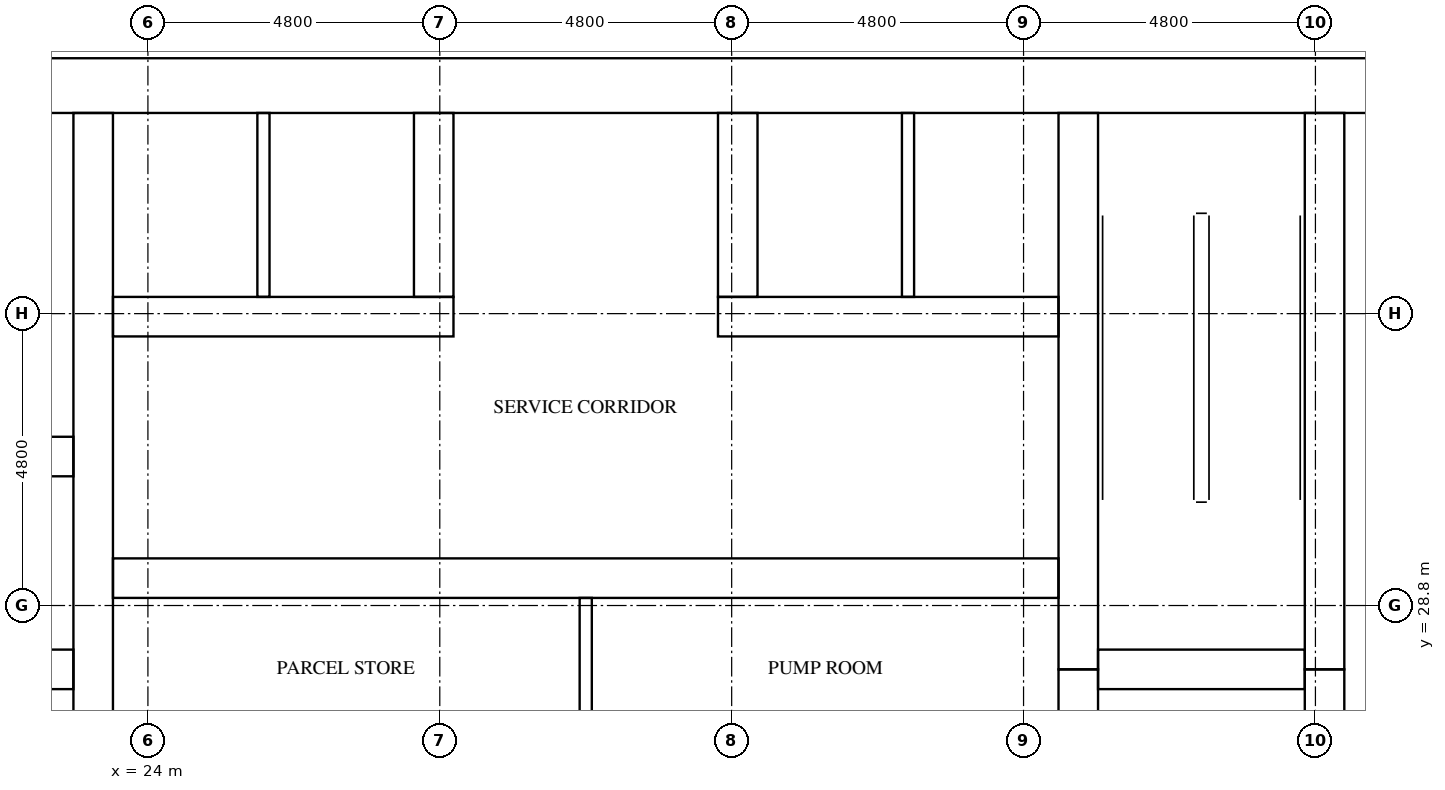
"""IFC4 building model, lengths in metres.
Left out: names, types, materials, properties, quantities, classifications, styles, units other than length and angle.
Written with IfcOpenShell. Run it as: python <this file> out.ifc"""

import sys

from ifc_helpers import new_model, si_unit, direction, frame, frame_2d, origin, place, context, subcontext, project, spatial, rectangle, extrude, element, fill, save


model = new_model("IFC4")
c1 = context("Model", 3, precision=1e-05, world=origin(), true_north=direction((0.0, 1.0)))
c2 = subcontext(c1, "Body", "Model", "MODEL_VIEW")
j1 = project(units=[si_unit("LENGTHUNIT", "METRE"), si_unit("PLANEANGLEUNIT", "RADIAN")], contexts=[c1])
p1 = place(None, origin())
s1 = spatial("IfcSite", under=j1, at=p1, CompositionType="ELEMENT")
p2 = place(p1, origin())
s2 = spatial("IfcBuilding", under=s1, at=p2, CompositionType="ELEMENT")
p3 = place(p2, frame((0.0, 0.0, 83.8)))
s3 = spatial("IfcBuildingStorey", under=s2, at=p3, CompositionType="ELEMENT", Elevation=83.8)
p4 = place(p3, frame((15.0, 37.35, 0.0), z_axis=(0.0, 0.0, 1.0), x_axis=(1.0, 0.0, 0.0)))
e1 = element("IfcWall", 1, at=p4, inside=s3, PredefinedType="SHEAR", context=c2, shape_type="SweptSolid", body=[
    extrude(rectangle(XDim=32.4, YDim=0.9, at=frame_2d((16.2, 0.0))), origin(), (0.0, 0.0, 1.0), 5.1),
])
p5 = place(p4, frame((15.3, 0.0, 0.0)))
e2 = element("IfcOpeningElement", 2, at=p5, cuts=e1, PredefinedType="OPENING", context=c2, shape_type="SweptSolid", body=[
    extrude(rectangle(XDim=1.8, YDim=2.1, at=frame_2d((0.9, 1.05))), frame((0.0, 0.46, 0.0), z_axis=(0.0, -1.0, 0.0), x_axis=(1.0, 0.0, 0.0)), (0.0, 0.0, 1.0), 0.92),
])
p6 = place(p4, frame((1.794, 0.0, 0.0)))
e3 = element("IfcOpeningElement", 3, at=p6, cuts=e1, PredefinedType="OPENING", context=c2, shape_type="SweptSolid", body=[
    extrude(rectangle(XDim=1.0, YDim=2.1, at=frame_2d((0.5, 1.05))), frame((0.0, 0.46, 0.0), z_axis=(0.0, -1.0, 0.0), x_axis=(1.0, 0.0, 0.0)), (0.0, 0.0, 1.0), 0.92),
])
p7 = place(p4, frame((5.331, 0.0, 0.0)))
e4 = element("IfcOpeningElement", 4, at=p7, cuts=e1, PredefinedType="OPENING", context=c2, shape_type="SweptSolid", body=[
    extrude(rectangle(XDim=1.0, YDim=2.1, at=frame_2d((0.5, 1.05))), frame((0.0, 0.46, 0.0), z_axis=(0.0, -1.0, 0.0), x_axis=(1.0, 0.0, 0.0)), (0.0, 0.0, 1.0), 0.92),
])
p8 = place(p3, frame((23.1, 15.9, 0.0), z_axis=(0.0, 0.0, 1.0), x_axis=(0.0, 1.0, 0.0)))
e5 = element("IfcWall", 5, at=p8, inside=s3, PredefinedType="SHEAR", context=c2, shape_type="SweptSolid", body=[
    extrude(rectangle(XDim=21.0, YDim=0.65, at=frame_2d((10.5, 0.0))), origin(), (0.0, 0.0, 1.0), 5.1),
])
p9 = place(p3, frame((39.3, 24.25, 0.0), z_axis=(0.0, 0.0, 1.0), x_axis=(0.0, 1.0, 0.0)))
e6 = element("IfcWall", 6, at=p9, inside=s3, PredefinedType="SHEAR", context=c2, shape_type="SweptSolid", body=[
    extrude(rectangle(XDim=3.5, YDim=0.65, at=frame_2d((1.75, 0.0))), origin(), (0.0, 0.0, 1.0), 5.1),
])
p10 = place(p3, frame((39.3, 27.75, 0.0), z_axis=(0.0, 0.0, 1.0), x_axis=(0.0, 1.0, 0.0)))
e7 = element("IfcWall", 7, at=p10, inside=s3, PredefinedType="SHEAR", context=c2, shape_type="SweptSolid", body=[
    extrude(rectangle(XDim=9.15, YDim=0.65, at=frame_2d((4.575, 0.0))), origin(), (0.0, 0.0, 1.0), 5.1),
])
p11 = place(p3, frame((43.35, 24.25, 0.0), z_axis=(0.0, 0.0, 1.0), x_axis=(0.0, 1.0, 0.0)))
e8 = element("IfcWall", 8, at=p11, inside=s3, PredefinedType="SHEAR", context=c2, shape_type="SweptSolid", body=[
    extrude(rectangle(XDim=3.5, YDim=0.65, at=frame_2d((1.75, 0.0))), origin(), (0.0, 0.0, 1.0), 5.1),
])
p12 = place(p11, frame((1.2, 0.0, 0.0)))
e9 = element("IfcOpeningElement", 9, at=p12, cuts=e8, PredefinedType="OPENING", context=c2, shape_type="SweptSolid", body=[
    extrude(rectangle(XDim=1.1, YDim=2.1, at=frame_2d((0.55, 1.05))), frame((0.0, 0.335, 0.0), z_axis=(0.0, -1.0, 0.0), x_axis=(1.0, 0.0, 0.0)), (0.0, 0.0, 1.0), 0.67),
])
p13 = place(p3, frame((43.35, 27.75, 0.0), z_axis=(0.0, 0.0, 1.0), x_axis=(0.0, 1.0, 0.0)))
e10 = element("IfcWall", 10, at=p13, inside=s3, PredefinedType="SHEAR", context=c2, shape_type="SweptSolid", body=[
    extrude(rectangle(XDim=9.15, YDim=0.65, at=frame_2d((4.575, 0.0))), origin(), (0.0, 0.0, 1.0), 5.1),
])
p14 = place(p13, frame((7.65, 0.0, 0.0)))
e11 = element("IfcOpeningElement", 11, at=p14, cuts=e10, PredefinedType="OPENING", context=c2, shape_type="SweptSolid", body=[
    extrude(rectangle(XDim=1.2, YDim=2.1, at=frame_2d((0.6, 1.05))), frame((0.0, 0.335, 0.0), z_axis=(0.0, -1.0, 0.0), x_axis=(1.0, 0.0, 0.0)), (0.0, 0.0, 1.0), 0.67),
])
p15 = place(p3, frame((19.375, 27.75, 0.0), z_axis=(0.0, 0.0, 1.0), x_axis=(1.0, 0.0, 0.0)))
e12 = element("IfcWall", 12, at=p15, inside=s3, PredefinedType="SHEAR", context=c2, shape_type="SweptSolid", body=[
    extrude(rectangle(XDim=3.4, YDim=0.65, at=frame_2d((1.7, 0.0))), origin(), (0.0, 0.0, 1.0), 5.1),
])
p16 = place(p3, frame((15.9, 31.25, 0.0), z_axis=(0.0, 0.0, 1.0), x_axis=(1.0, 0.0, 0.0)))
e13 = element("IfcWall", 13, at=p16, inside=s3, PredefinedType="SHEAR", context=c2, shape_type="SweptSolid", body=[
    extrude(rectangle(XDim=6.875, YDim=0.65, at=frame_2d((3.438, 0.0))), origin(), (0.0, 0.0, 1.0), 5.1),
])
p17 = place(p3, frame((39.625, 27.75, 0.0), z_axis=(0.0, 0.0, 1.0), x_axis=(1.0, 0.0, 0.0)))
e14 = element("IfcWall", 14, at=p17, inside=s3, PredefinedType="SHEAR", context=c2, shape_type="SweptSolid", body=[
    extrude(rectangle(XDim=3.4, YDim=0.65, at=frame_2d((1.7, 0.0))), origin(), (0.0, 0.0, 1.0), 5.1),
])
p18 = place(p3, frame((23.425, 29.25, 0.0), z_axis=(0.0, 0.0, 1.0), x_axis=(1.0, 0.0, 0.0)))
e15 = element("IfcWall", 15, at=p18, inside=s3, PredefinedType="SHEAR", context=c2, shape_type="SweptSolid", body=[
    extrude(rectangle(XDim=15.55, YDim=0.65, at=frame_2d((7.775, 0.0))), origin(), (0.0, 0.0, 1.0), 5.1),
])
p19 = place(p18, frame((3.337, 0.0, 0.0)))
e16 = element("IfcOpeningElement", 16, at=p19, cuts=e15, PredefinedType="OPENING", context=c2, shape_type="SweptSolid", body=[
    extrude(rectangle(XDim=1.0, YDim=2.1, at=frame_2d((0.5, 1.05))), frame((0.0, 0.335, 0.0), z_axis=(0.0, -1.0, 0.0), x_axis=(1.0, 0.0, 0.0)), (0.0, 0.0, 1.0), 0.67),
])
p20 = place(p18, frame((11.212, 0.0, 0.0)))
e17 = element("IfcOpeningElement", 17, at=p20, cuts=e15, PredefinedType="OPENING", context=c2, shape_type="SweptSolid", body=[
    extrude(rectangle(XDim=1.0, YDim=2.1, at=frame_2d((0.5, 1.05))), frame((0.0, 0.335, 0.0), z_axis=(0.0, -1.0, 0.0), x_axis=(1.0, 0.0, 0.0)), (0.0, 0.0, 1.0), 0.67),
])
p21 = place(p3, frame((23.425, 33.55, 0.0), z_axis=(0.0, 0.0, 1.0), x_axis=(1.0, 0.0, 0.0)))
e18 = element("IfcWall", 18, at=p21, inside=s3, PredefinedType="SHEAR", context=c2, shape_type="SweptSolid", body=[
    extrude(rectangle(XDim=5.6, YDim=0.65, at=frame_2d((2.8, 0.0))), origin(), (0.0, 0.0, 1.0), 5.1),
])
p22 = place(p3, frame((33.375, 33.55, 0.0), z_axis=(0.0, 0.0, 1.0), x_axis=(1.0, 0.0, 0.0)))
e19 = element("IfcWall", 19, at=p22, inside=s3, PredefinedType="SHEAR", context=c2, shape_type="SweptSolid", body=[
    extrude(rectangle(XDim=5.6, YDim=0.65, at=frame_2d((2.8, 0.0))), origin(), (0.0, 0.0, 1.0), 5.1),
])
for number, where, z_axis, x_axis in (
    (20, (28.7, 33.875, 0.0), (0.0, 0.0, 1.0), (0.0, 1.0, 0.0)),
    (21, (33.7, 33.875, 0.0), (0.0, 0.0, 1.0), (0.0, 1.0, 0.0)),
):
    element("IfcWall", number, at=place(p3, frame(where, z_axis=z_axis, x_axis=x_axis)), inside=s3, PredefinedType="SHEAR", context=c2, shape_type="SweptSolid", body=[
        extrude(rectangle(XDim=3.025, YDim=0.65, at=frame_2d((1.512, 0.0))), origin(), (0.0, 0.0, 1.0), 5.1),
    ])
for number, where, z_axis, x_axis in (
    (22, (25.9, 33.875, 0.0), (0.0, 0.0, 1.0), (0.0, 1.0, 0.0)),
    (23, (36.5, 33.875, 0.0), (0.0, 0.0, 1.0), (0.0, 1.0, 0.0)),
):
    element("IfcWall", number, at=place(p3, frame(where, z_axis=z_axis, x_axis=x_axis)), inside=s3, PredefinedType="SOLIDWALL", context=c2, shape_type="SweptSolid", body=[
        extrude(rectangle(XDim=3.025, YDim=0.2, at=frame_2d((1.512, 0.0))), origin(), (0.0, 0.0, 1.0), 5.1),
    ])
p23 = place(p3, frame((31.2, 26.475, 0.0), z_axis=(0.0, 0.0, 1.0), x_axis=(0.0, 1.0, 0.0)))
e24 = element("IfcWall", 24, at=p23, inside=s3, PredefinedType="PARTITIONING", context=c2, shape_type="SweptSolid", body=[
    extrude(rectangle(XDim=2.45, YDim=0.2, at=frame_2d((1.225, 0.0))), origin(), (0.0, 0.0, 1.0), 5.1),
])
p24 = place(p14, origin())
e25 = element("IfcDoor", 25, at=p24, inside=s3, OperationType="SINGLE_SWING_LEFT", PredefinedType="DOOR", context=c2, shape_type="SweptSolid", body=[
    extrude(rectangle(XDim=1.2, YDim=2.1, at=frame_2d((0.6, 1.05))), frame((0.0, 0.025, 0.0), z_axis=(0.0, -1.0, 0.0), x_axis=(1.0, 0.0, 0.0)), (0.0, 0.0, 1.0), 0.05),
])
fill(e11, e25)
p25 = place(p5, origin())
e26 = element("IfcDoor", 26, at=p25, inside=s3, OperationType="DOUBLE_DOOR_SINGLE_SWING", PredefinedType="DOOR", context=c2, shape_type="SweptSolid", body=[
    extrude(rectangle(XDim=1.8, YDim=2.1, at=frame_2d((0.9, 1.05))), frame((0.0, 0.025, 0.0), z_axis=(0.0, -1.0, 0.0), x_axis=(1.0, 0.0, 0.0)), (0.0, 0.0, 1.0), 0.05),
])
fill(e2, e26)
p26 = place(p19, origin())
e27 = element("IfcDoor", 27, at=p26, inside=s3, OperationType="SINGLE_SWING_LEFT", PredefinedType="DOOR", context=c2, shape_type="SweptSolid", body=[
    extrude(rectangle(XDim=1.0, YDim=2.1, at=frame_2d((0.5, 1.05))), frame((0.0, 0.025, 0.0), z_axis=(0.0, -1.0, 0.0), x_axis=(1.0, 0.0, 0.0)), (0.0, 0.0, 1.0), 0.05),
])
fill(e16, e27)
p27 = place(p20, origin())
e28 = element("IfcDoor", 28, at=p27, inside=s3, OperationType="SINGLE_SWING_RIGHT", PredefinedType="DOOR", context=c2, shape_type="SweptSolid", body=[
    extrude(rectangle(XDim=1.0, YDim=2.1, at=frame_2d((0.5, 1.05))), frame((0.0, 0.025, 0.0), z_axis=(0.0, -1.0, 0.0), x_axis=(1.0, 0.0, 0.0)), (0.0, 0.0, 1.0), 0.05),
])
fill(e17, e28)
save(model, sys.argv[1])
